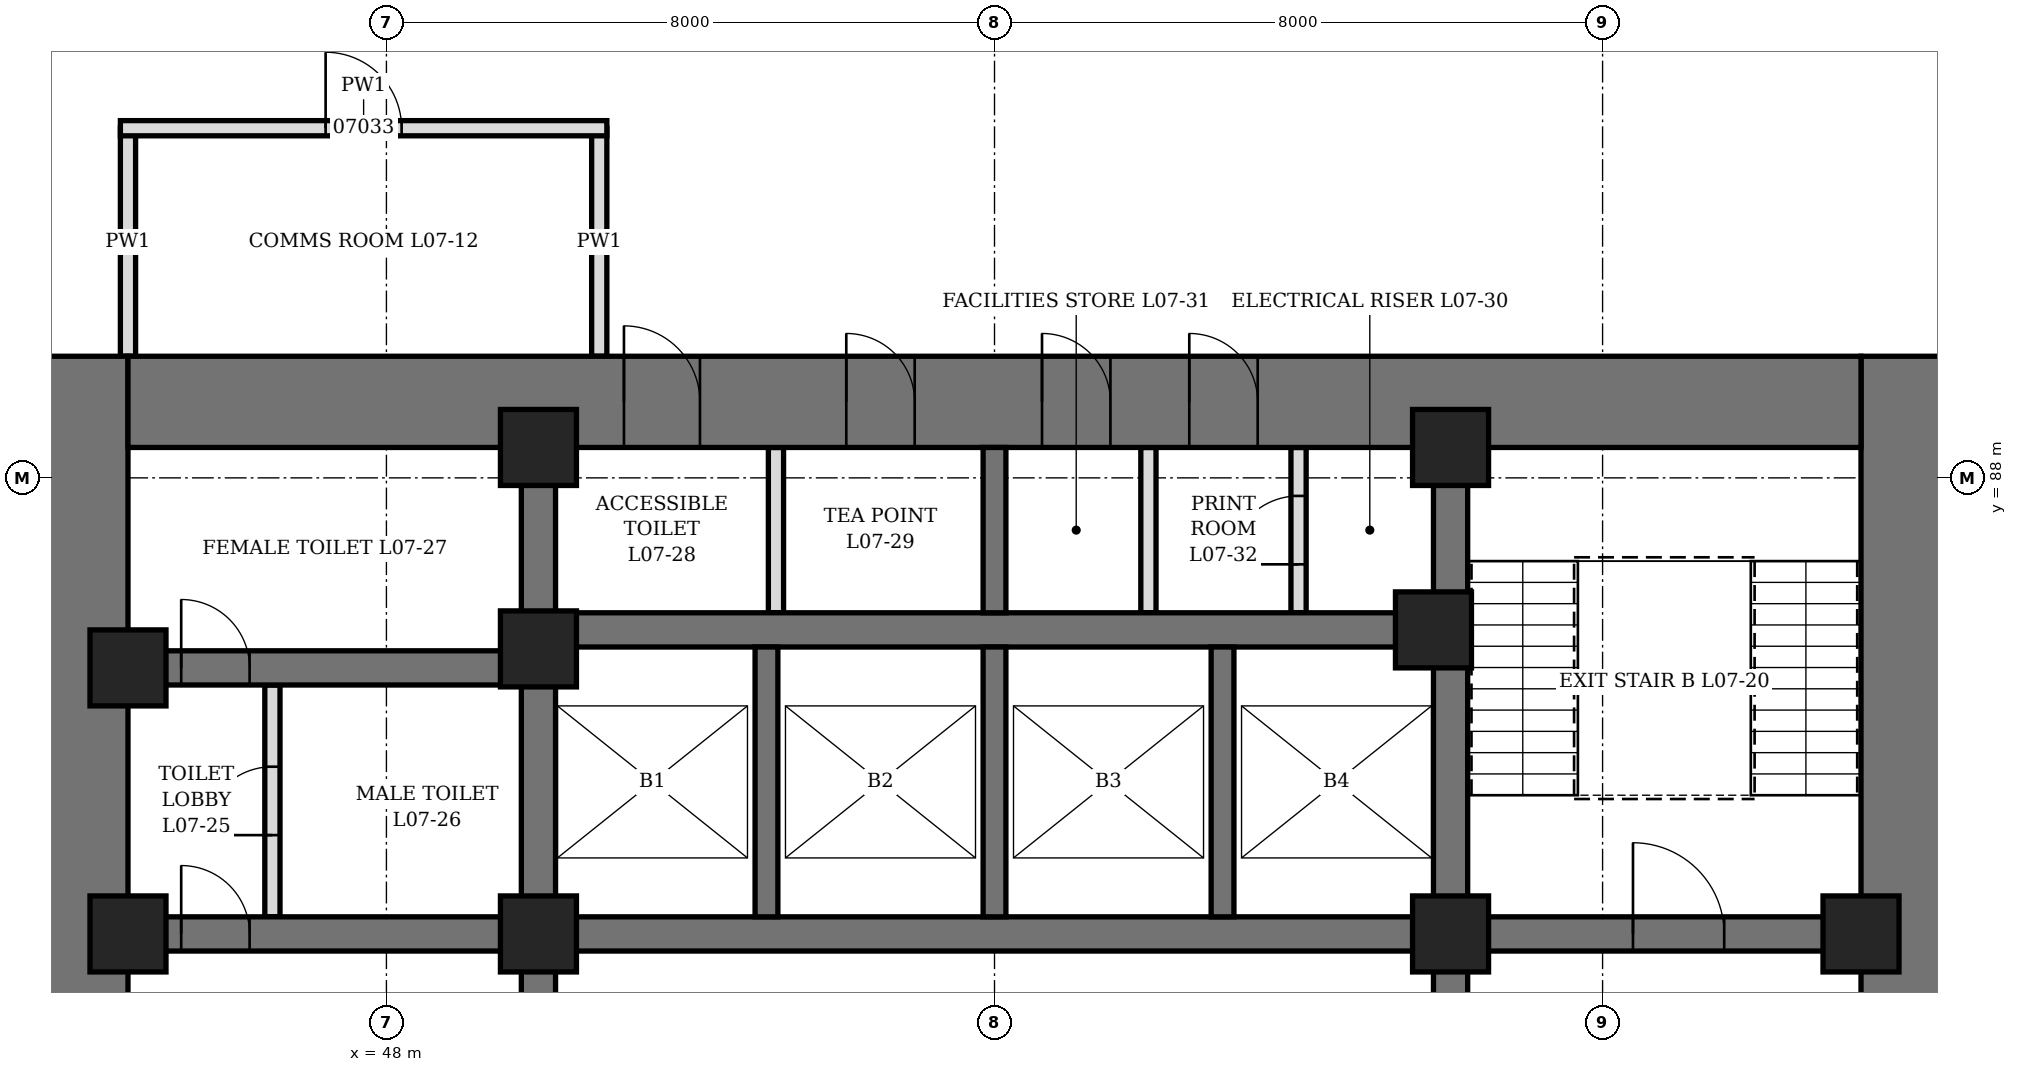
"""IFC4 building model, lengths in metres.
Left out: names, types, materials, properties, quantities, classifications, styles, units other than length and angle.
Written with IfcOpenShell. Run it as: python <this file> out.ifc"""

import sys

from ifc_helpers import new_model, si_unit, direction, frame, frame_2d, origin, origin_2d, place, context, subcontext, project, spatial, rectangle, hollow_rectangle, extrude, element, fill, save


model = new_model("IFC4")
c1 = context("Model", 3, precision=1e-05, world=origin(), true_north=direction((0.0, 1.0)))
c2 = subcontext(c1, "Body", "Model", "MODEL_VIEW")
j1 = project(units=[si_unit("LENGTHUNIT", "METRE"), si_unit("PLANEANGLEUNIT", "RADIAN")], contexts=[c1])
p1 = place(None, origin())
s1 = spatial("IfcSite", under=j1, at=p1, CompositionType="ELEMENT")
p2 = place(p1, origin())
s2 = spatial("IfcBuilding", under=s1, at=p2, CompositionType="ELEMENT")
p3 = place(p2, frame((0.0, 0.0, 39.1)))
s3 = spatial("IfcBuildingStorey", under=s2, at=p3, CompositionType="ELEMENT", Elevation=39.1)
p4 = place(p3, frame((44.0, 70.4, 0.0), z_axis=(0.0, 0.0, 1.0), x_axis=(0.0, 1.0, 0.0)))
e1 = element("IfcWall", 1, at=p4, inside=s3, PredefinedType="SHEAR", context=c2, shape_type="SweptSolid", body=[
    extrude(rectangle(XDim=19.2, YDim=1.2, at=frame_2d((9.6, 0.0))), origin(), (0.0, 0.0, 1.0), 4.2),
])
p5 = place(p4, frame((8.6, 0.0, 0.0)))
e2 = element("IfcOpeningElement", 2, at=p5, cuts=e1, PredefinedType="OPENING", context=c2, shape_type="SweptSolid", body=[
    extrude(rectangle(XDim=2.0, YDim=2.4, at=frame_2d((1.0, 1.2))), frame((0.0, 0.61, 0.0), z_axis=(0.0, -1.0, 0.0), x_axis=(1.0, 0.0, 0.0)), (0.0, 0.0, 1.0), 1.22),
])
p6 = place(p3, frame((68.0, 70.4, 0.0), z_axis=(0.0, 0.0, 1.0), x_axis=(0.0, 1.0, 0.0)))
e3 = element("IfcWall", 3, at=p6, inside=s3, PredefinedType="SHEAR", context=c2, shape_type="SweptSolid", body=[
    extrude(rectangle(XDim=19.2, YDim=1.2, at=frame_2d((9.6, 0.0))), origin(), (0.0, 0.0, 1.0), 4.2),
])
p7 = place(p6, frame((8.6, 0.0, 0.0)))
e4 = element("IfcOpeningElement", 4, at=p7, cuts=e3, PredefinedType="OPENING", context=c2, shape_type="SweptSolid", body=[
    extrude(rectangle(XDim=2.0, YDim=2.4, at=frame_2d((1.0, 1.2))), frame((0.0, 0.61, 0.0), z_axis=(0.0, -1.0, 0.0), x_axis=(1.0, 0.0, 0.0)), (0.0, 0.0, 1.0), 1.22),
])
p8 = place(p3, frame((44.6, 89.0, 0.0), z_axis=(0.0, 0.0, 1.0), x_axis=(1.0, 0.0, 0.0)))
e5 = element("IfcWall", 5, at=p8, inside=s3, PredefinedType="SHEAR", context=c2, shape_type="SweptSolid", body=[
    extrude(rectangle(XDim=22.8, YDim=1.2, at=frame_2d((11.4, 0.0))), origin(), (0.0, 0.0, 1.0), 4.2),
])
p9 = place(p8, frame((6.525, 0.0, 0.0)))
e6 = element("IfcOpeningElement", 6, at=p9, cuts=e5, PredefinedType="OPENING", context=c2, shape_type="SweptSolid", body=[
    extrude(rectangle(XDim=1.0, YDim=2.1, at=frame_2d((0.5, 1.05))), frame((0.0, 0.61, 0.0), z_axis=(0.0, -1.0, 0.0), x_axis=(1.0, 0.0, 0.0)), (0.0, 0.0, 1.0), 1.22),
])
p10 = place(p8, frame((9.45, 0.0, 0.0)))
e7 = element("IfcOpeningElement", 7, at=p10, cuts=e5, PredefinedType="OPENING", context=c2, shape_type="SweptSolid", body=[
    extrude(rectangle(XDim=0.9, YDim=2.1, at=frame_2d((0.45, 1.05))), frame((0.0, 0.61, 0.0), z_axis=(0.0, -1.0, 0.0), x_axis=(1.0, 0.0, 0.0)), (0.0, 0.0, 1.0), 1.22),
])
p11 = place(p8, frame((12.025, 0.0, 0.0)))
e8 = element("IfcOpeningElement", 8, at=p11, cuts=e5, PredefinedType="OPENING", context=c2, shape_type="SweptSolid", body=[
    extrude(rectangle(XDim=0.9, YDim=2.1, at=frame_2d((0.45, 1.05))), frame((0.0, 0.61, 0.0), z_axis=(0.0, -1.0, 0.0), x_axis=(1.0, 0.0, 0.0)), (0.0, 0.0, 1.0), 1.22),
])
p12 = place(p8, frame((13.962, 0.0, 0.0)))
e9 = element("IfcOpeningElement", 9, at=p12, cuts=e5, PredefinedType="OPENING", context=c2, shape_type="SweptSolid", body=[
    extrude(rectangle(XDim=0.9, YDim=2.1, at=frame_2d((0.45, 1.05))), frame((0.0, 0.61, 0.0), z_axis=(0.0, -1.0, 0.0), x_axis=(1.0, 0.0, 0.0)), (0.0, 0.0, 1.0), 1.22),
])
p13 = place(p3, frame((50.0, 71.6, 0.0), z_axis=(0.0, 0.0, 1.0), x_axis=(0.0, 1.0, 0.0)))
e10 = element("IfcWall", 10, at=p13, inside=s3, PredefinedType="SHEAR", context=c2, shape_type="SweptSolid", body=[
    extrude(rectangle(XDim=16.8, YDim=0.45, at=frame_2d((8.4, 0.0))), origin(), (0.0, 0.0, 1.0), 4.2),
])
p14 = place(p13, frame((7.5, 0.0, 0.0)))
e11 = element("IfcOpeningElement", 11, at=p14, cuts=e10, PredefinedType="OPENING", context=c2, shape_type="SweptSolid", body=[
    extrude(rectangle(XDim=1.8, YDim=2.4, at=frame_2d((0.9, 1.2))), frame((0.0, 0.235, 0.0), z_axis=(0.0, -1.0, 0.0), x_axis=(1.0, 0.0, 0.0)), (0.0, 0.0, 1.0), 0.47),
])
p15 = place(p3, frame((62.0, 71.6, 0.0), z_axis=(0.0, 0.0, 1.0), x_axis=(0.0, 1.0, 0.0)))
e12 = element("IfcWall", 12, at=p15, inside=s3, PredefinedType="SHEAR", context=c2, shape_type="SweptSolid", body=[
    extrude(rectangle(XDim=16.8, YDim=0.45, at=frame_2d((8.4, 0.0))), origin(), (0.0, 0.0, 1.0), 4.2),
])
p16 = place(p15, frame((7.5, 0.0, 0.0)))
e13 = element("IfcOpeningElement", 13, at=p16, cuts=e12, PredefinedType="OPENING", context=c2, shape_type="SweptSolid", body=[
    extrude(rectangle(XDim=1.8, YDim=2.4, at=frame_2d((0.9, 1.2))), frame((0.0, 0.235, 0.0), z_axis=(0.0, -1.0, 0.0), x_axis=(1.0, 0.0, 0.0)), (0.0, 0.0, 1.0), 0.47),
])
p17 = place(p3, frame((44.6, 82.0, 0.0), z_axis=(0.0, 0.0, 1.0), x_axis=(1.0, 0.0, 0.0)))
e14 = element("IfcWall", 14, at=p17, inside=s3, PredefinedType="SHEAR", context=c2, shape_type="SweptSolid", body=[
    extrude(rectangle(XDim=5.175, YDim=0.45, at=frame_2d((2.587, 0.0))), origin(), (0.0, 0.0, 1.0), 4.2),
])
p18 = place(p17, frame((0.7, 0.0, 0.0)))
e15 = element("IfcOpeningElement", 15, at=p18, cuts=e14, PredefinedType="OPENING", context=c2, shape_type="SweptSolid", body=[
    extrude(rectangle(XDim=0.9, YDim=2.1, at=frame_2d((0.45, 1.05))), frame((0.0, 0.235, 0.0), z_axis=(0.0, -1.0, 0.0), x_axis=(1.0, 0.0, 0.0)), (0.0, 0.0, 1.0), 0.47),
])
p19 = place(p3, frame((44.6, 85.5, 0.0), z_axis=(0.0, 0.0, 1.0), x_axis=(1.0, 0.0, 0.0)))
e16 = element("IfcWall", 16, at=p19, inside=s3, PredefinedType="SHEAR", context=c2, shape_type="SweptSolid", body=[
    extrude(rectangle(XDim=5.175, YDim=0.45, at=frame_2d((2.587, 0.0))), origin(), (0.0, 0.0, 1.0), 4.2),
])
p20 = place(p19, frame((0.7, 0.0, 0.0)))
e17 = element("IfcOpeningElement", 17, at=p20, cuts=e16, PredefinedType="OPENING", context=c2, shape_type="SweptSolid", body=[
    extrude(rectangle(XDim=0.9, YDim=2.1, at=frame_2d((0.45, 1.05))), frame((0.0, 0.235, 0.0), z_axis=(0.0, -1.0, 0.0), x_axis=(1.0, 0.0, 0.0)), (0.0, 0.0, 1.0), 0.47),
])
p21 = place(p3, frame((62.225, 82.0, 0.0), z_axis=(0.0, 0.0, 1.0), x_axis=(1.0, 0.0, 0.0)))
e18 = element("IfcWall", 18, at=p21, inside=s3, PredefinedType="SHEAR", context=c2, shape_type="SweptSolid", body=[
    extrude(rectangle(XDim=5.175, YDim=0.45, at=frame_2d((2.587, 0.0))), origin(), (0.0, 0.0, 1.0), 4.2),
])
p22 = place(p21, frame((2.175, 0.0, 0.0)))
e19 = element("IfcOpeningElement", 19, at=p22, cuts=e18, PredefinedType="OPENING", context=c2, shape_type="SweptSolid", body=[
    extrude(rectangle(XDim=1.2, YDim=2.1, at=frame_2d((0.6, 1.05))), frame((0.0, 0.235, 0.0), z_axis=(0.0, -1.0, 0.0), x_axis=(1.0, 0.0, 0.0)), (0.0, 0.0, 1.0), 0.47),
])
for number, where, z_axis, x_axis in (
    (20, (50.225, 82.0, 0.0), (0.0, 0.0, 1.0), (1.0, 0.0, 0.0)),
    (21, (50.225, 86.0, 0.0), (0.0, 0.0, 1.0), (1.0, 0.0, 0.0)),
):
    element("IfcWall", number, at=place(p3, frame(where, z_axis=z_axis, x_axis=x_axis)), inside=s3, PredefinedType="SHEAR", context=c2, shape_type="SweptSolid", body=[
        extrude(rectangle(XDim=11.55, YDim=0.45, at=frame_2d((5.775, 0.0))), origin(), (0.0, 0.0, 1.0), 4.2),
    ])
for number, where, z_axis, x_axis in (
    (22, (53.0, 82.225, 0.0), (0.0, 0.0, 1.0), (0.0, 1.0, 0.0)),
    (23, (56.0, 82.225, 0.0), (0.0, 0.0, 1.0), (0.0, 1.0, 0.0)),
    (24, (59.0, 82.225, 0.0), (0.0, 0.0, 1.0), (0.0, 1.0, 0.0)),
):
    element("IfcWall", number, at=place(p3, frame(where, z_axis=z_axis, x_axis=x_axis)), inside=s3, PredefinedType="SHEAR", context=c2, shape_type="SweptSolid", body=[
        extrude(rectangle(XDim=3.55, YDim=0.3, at=frame_2d((1.775, 0.0))), origin(), (0.0, 0.0, 1.0), 4.2),
    ])
p23 = place(p3, frame((56.0, 86.225, 0.0), z_axis=(0.0, 0.0, 1.0), x_axis=(0.0, 1.0, 0.0)))
e25 = element("IfcWall", 25, at=p23, inside=s3, PredefinedType="SHEAR", context=c2, shape_type="SweptSolid", body=[
    extrude(rectangle(XDim=2.175, YDim=0.3, at=frame_2d((1.087, 0.0))), origin(), (0.0, 0.0, 1.0), 4.2),
])
for number, where, z_axis, x_axis in (
    (26, (44.6, 82.0, 0.0), (0.0, 0.0, 1.0), (1.0, 0.0, 0.0)),
    (27, (44.6, 85.5, 0.0), (0.0, 0.0, 1.0), (1.0, 0.0, 0.0)),
    (28, (50.0, 82.0, 0.0), (0.0, 0.0, 1.0), (1.0, 0.0, 0.0)),
    (29, (50.0, 85.75, 0.0), (0.0, 0.0, 1.0), (1.0, 0.0, 0.0)),
    (30, (50.0, 88.4, 0.0), (0.0, 0.0, 1.0), (1.0, 0.0, 0.0)),
    (31, (61.775, 86.0, 0.0), (0.0, 0.0, 1.0), (1.0, 0.0, 0.0)),
    (32, (62.0, 82.0, 0.0), (0.0, 0.0, 1.0), (1.0, 0.0, 0.0)),
    (33, (62.0, 88.4, 0.0), (0.0, 0.0, 1.0), (1.0, 0.0, 0.0)),
    (34, (67.4, 82.0, 0.0), (0.0, 0.0, 1.0), (1.0, 0.0, 0.0)),
):
    element("IfcColumn", number, at=place(p3, frame(where, z_axis=z_axis, x_axis=x_axis)), inside=s3, PredefinedType="COLUMN", context=c2, shape_type="SweptSolid", body=[
        extrude(hollow_rectangle(XDim=1.0, YDim=1.0, WallThickness=0.15, at=origin_2d()), origin(), (0.0, 0.0, 1.0), 4.2),
    ])
p24 = place(p3, frame((46.5, 82.225, 0.0), z_axis=(0.0, 0.0, 1.0), x_axis=(0.0, 1.0, 0.0)))
e35 = element("IfcWall", 35, at=p24, inside=s3, PredefinedType="PARTITIONING", context=c2, shape_type="SweptSolid", body=[
    extrude(rectangle(XDim=3.05, YDim=0.2, at=frame_2d((1.525, 0.0))), origin(), (0.0, 0.0, 1.0), 4.04),
])
p25 = place(p24, frame((1.075, 0.0, 0.0)))
e36 = element("IfcOpeningElement", 36, at=p25, cuts=e35, PredefinedType="OPENING", context=c2, shape_type="SweptSolid", body=[
    extrude(rectangle(XDim=0.9, YDim=2.1, at=frame_2d((0.45, 1.05))), frame((0.0, 0.11, 0.0), z_axis=(0.0, -1.0, 0.0), x_axis=(1.0, 0.0, 0.0)), (0.0, 0.0, 1.0), 0.22),
])
p26 = place(p3, frame((53.125, 86.225, 0.0), z_axis=(0.0, 0.0, 1.0), x_axis=(0.0, 1.0, 0.0)))
e37 = element("IfcWall", 37, at=p26, inside=s3, PredefinedType="PARTITIONING", context=c2, shape_type="SweptSolid", body=[
    extrude(rectangle(XDim=2.175, YDim=0.2, at=frame_2d((1.087, 0.0))), origin(), (0.0, 0.0, 1.0), 2.54),
])
p27 = place(p3, frame((60.0, 86.225, 0.0), z_axis=(0.0, 0.0, 1.0), x_axis=(0.0, 1.0, 0.0)))
e38 = element("IfcWall", 38, at=p27, inside=s3, PredefinedType="PARTITIONING", context=c2, shape_type="SweptSolid", body=[
    extrude(rectangle(XDim=2.175, YDim=0.2, at=frame_2d((1.087, 0.0))), origin(), (0.0, 0.0, 1.0), 4.04),
])
p28 = place(p27, frame((0.637, 0.0, 0.0)))
e39 = element("IfcOpeningElement", 39, at=p28, cuts=e38, PredefinedType="OPENING", context=c2, shape_type="SweptSolid", body=[
    extrude(rectangle(XDim=0.9, YDim=2.1, at=frame_2d((0.45, 1.05))), frame((0.0, 0.11, 0.0), z_axis=(0.0, -1.0, 0.0), x_axis=(1.0, 0.0, 0.0)), (0.0, 0.0, 1.0), 0.22),
])
p29 = place(p3, frame((58.025, 86.225, 0.0), z_axis=(0.0, 0.0, 1.0), x_axis=(0.0, 1.0, 0.0)))
e40 = element("IfcWall", 40, at=p29, inside=s3, PredefinedType="PARTITIONING", context=c2, shape_type="SweptSolid", body=[
    extrude(rectangle(XDim=2.175, YDim=0.2, at=frame_2d((1.087, 0.0))), origin(), (0.0, 0.0, 1.0), 4.04),
])
for number, where, z_axis, x_axis in (
    (41, (44.6, 89.6, 0.0), (0.0, 0.0, 1.0), (0.0, 1.0, 0.0)),
    (42, (50.8, 89.6, 0.0), (0.0, 0.0, 1.0), (0.0, 1.0, 0.0)),
):
    element("IfcWall", number, at=place(p3, frame(where, z_axis=z_axis, x_axis=x_axis)), inside=s3, PredefinedType="PARTITIONING", context=c2, shape_type="SweptSolid", body=[
        extrude(rectangle(XDim=3.0, YDim=0.2, at=frame_2d((1.5, 0.0))), origin(), (0.0, 0.0, 1.0), 4.04),
    ])
p30 = place(p3, frame((44.5, 92.6, 0.0), z_axis=(0.0, 0.0, 1.0), x_axis=(1.0, 0.0, 0.0)))
e43 = element("IfcWall", 43, at=p30, inside=s3, PredefinedType="PARTITIONING", context=c2, shape_type="SweptSolid", body=[
    extrude(rectangle(XDim=6.4, YDim=0.2, at=frame_2d((3.2, 0.0))), origin(), (0.0, 0.0, 1.0), 4.04),
])
p31 = place(p30, frame((2.7, 0.0, 0.0)))
e44 = element("IfcOpeningElement", 44, at=p31, cuts=e43, PredefinedType="OPENING", context=c2, shape_type="SweptSolid", body=[
    extrude(rectangle(XDim=1.0, YDim=2.1, at=frame_2d((0.5, 1.05))), frame((0.0, 0.11, 0.0), z_axis=(0.0, -1.0, 0.0), x_axis=(1.0, 0.0, 0.0)), (0.0, 0.0, 1.0), 0.22),
])
p32 = place(p18, origin())
e45 = element("IfcDoor", 45, at=p32, inside=s3, OperationType="SINGLE_SWING_LEFT", PredefinedType="DOOR", context=c2, shape_type="SweptSolid", body=[
    extrude(rectangle(XDim=0.9, YDim=2.1, at=frame_2d((0.45, 1.05))), frame((0.0, 0.225, 0.0), z_axis=(0.0, -1.0, 0.0), x_axis=(1.0, 0.0, 0.0)), (0.0, 0.0, 1.0), 0.449),
])
fill(e15, e45)
p33 = place(p25, origin())
e46 = element("IfcDoor", 46, at=p33, inside=s3, OperationType="SINGLE_SWING_RIGHT", PredefinedType="DOOR", context=c2, shape_type="SweptSolid", body=[
    extrude(rectangle(XDim=0.9, YDim=2.1, at=frame_2d((0.45, 1.05))), frame((0.0, 0.1, 0.0), z_axis=(0.0, -1.0, 0.0), x_axis=(1.0, 0.0, 0.0)), (0.0, 0.0, 1.0), 0.199),
])
fill(e36, e46)
p34 = place(p20, origin())
e47 = element("IfcDoor", 47, at=p34, inside=s3, OperationType="SINGLE_SWING_RIGHT", PredefinedType="DOOR", context=c2, shape_type="SweptSolid", body=[
    extrude(rectangle(XDim=0.9, YDim=2.1, at=frame_2d((0.45, 1.05))), frame((0.0, 0.225, 0.0), z_axis=(0.0, -1.0, 0.0), x_axis=(1.0, 0.0, 0.0)), (0.0, 0.0, 1.0), 0.449),
])
fill(e17, e47)
p35 = place(p9, origin())
e48 = element("IfcDoor", 48, at=p35, inside=s3, OperationType="SINGLE_SWING_LEFT", PredefinedType="DOOR", context=c2, shape_type="SweptSolid", body=[
    extrude(rectangle(XDim=1.0, YDim=2.1, at=frame_2d((0.5, 1.05))), frame((0.0, 0.35, 0.0), z_axis=(0.0, -1.0, 0.0), x_axis=(1.0, 0.0, 0.0)), (0.0, 0.0, 1.0), 0.7),
])
fill(e6, e48)
p36 = place(p10, origin())
e49 = element("IfcDoor", 49, at=p36, inside=s3, OperationType="SINGLE_SWING_LEFT", PredefinedType="DOOR", context=c2, shape_type="SweptSolid", body=[
    extrude(rectangle(XDim=0.9, YDim=2.1, at=frame_2d((0.45, 1.05))), frame((0.0, 0.35, 0.0), z_axis=(0.0, -1.0, 0.0), x_axis=(1.0, 0.0, 0.0)), (0.0, 0.0, 1.0), 0.7),
])
fill(e7, e49)
p37 = place(p11, origin())
e50 = element("IfcDoor", 50, at=p37, inside=s3, OperationType="SINGLE_SWING_LEFT", PredefinedType="DOOR", context=c2, shape_type="SweptSolid", body=[
    extrude(rectangle(XDim=0.9, YDim=2.1, at=frame_2d((0.45, 1.05))), frame((0.0, 0.35, 0.0), z_axis=(0.0, -1.0, 0.0), x_axis=(1.0, 0.0, 0.0)), (0.0, 0.0, 1.0), 0.7),
])
fill(e8, e50)
p38 = place(p12, origin())
e51 = element("IfcDoor", 51, at=p38, inside=s3, OperationType="SINGLE_SWING_LEFT", PredefinedType="DOOR", context=c2, shape_type="SweptSolid", body=[
    extrude(rectangle(XDim=0.9, YDim=2.1, at=frame_2d((0.45, 1.05))), frame((0.0, 0.35, 0.0), z_axis=(0.0, -1.0, 0.0), x_axis=(1.0, 0.0, 0.0)), (0.0, 0.0, 1.0), 0.7),
])
fill(e9, e51)
p39 = place(p28, origin())
e52 = element("IfcDoor", 52, at=p39, inside=s3, OperationType="SINGLE_SWING_LEFT", PredefinedType="DOOR", context=c2, shape_type="SweptSolid", body=[
    extrude(rectangle(XDim=0.9, YDim=2.1, at=frame_2d((0.45, 1.05))), frame((0.0, 0.1, 0.0), z_axis=(0.0, -1.0, 0.0), x_axis=(1.0, 0.0, 0.0)), (0.0, 0.0, 1.0), 0.199),
])
fill(e39, e52)
p40 = place(p22, origin())
e53 = element("IfcDoor", 53, at=p40, inside=s3, OperationType="SINGLE_SWING_LEFT", PredefinedType="DOOR", context=c2, shape_type="SweptSolid", body=[
    extrude(rectangle(XDim=1.2, YDim=2.1, at=frame_2d((0.6, 1.05))), frame((0.0, 0.225, 0.0), z_axis=(0.0, -1.0, 0.0), x_axis=(1.0, 0.0, 0.0)), (0.0, 0.0, 1.0), 0.449),
])
fill(e19, e53)
p41 = place(p31, origin())
e54 = element("IfcDoor", 54, at=p41, inside=s3, OperationType="SINGLE_SWING_LEFT", PredefinedType="DOOR", context=c2, shape_type="SweptSolid", body=[
    extrude(rectangle(XDim=1.0, YDim=2.1, at=frame_2d((0.5, 1.05))), frame((0.0, 0.1, 0.0), z_axis=(0.0, -1.0, 0.0), x_axis=(1.0, 0.0, 0.0)), (0.0, 0.0, 1.0), 0.199),
])
fill(e44, e54)
save(model, sys.argv[1])
